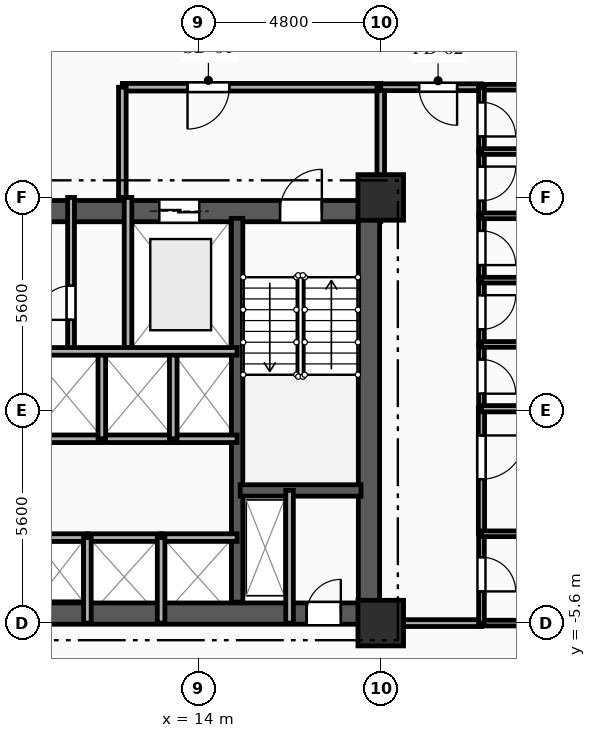
"""IFC4 building model, lengths in metres.
Left out: names, types, materials, properties, quantities, classifications, styles, units other than length and angle.
Written with IfcOpenShell. Run it as: python <this file> out.ifc"""

import sys

from ifc_helpers import new_model, si_unit, direction, frame, frame_2d, origin, origin_2d, place, context, subcontext, project, spatial, rectangle, extrude, element, fill, save


model = new_model("IFC4")
c1 = context("Model", 3, precision=1e-05, world=origin(), true_north=direction((0.0, 1.0)))
c2 = subcontext(c1, "Body", "Model", "MODEL_VIEW")
j1 = project(units=[si_unit("LENGTHUNIT", "METRE"), si_unit("PLANEANGLEUNIT", "RADIAN")], contexts=[c1])
p1 = place(None, origin())
s1 = spatial("IfcSite", under=j1, at=p1, CompositionType="ELEMENT")
p2 = place(p1, origin())
s2 = spatial("IfcBuilding", under=s1, at=p2, CompositionType="ELEMENT")
p3 = place(p2, frame((0.0, 0.0, 33.7)))
s3 = spatial("IfcBuildingStorey", under=s2, at=p3, CompositionType="ELEMENT", Elevation=33.7)
for number, where, z_axis, x_axis in (
    (1, (18.8, -5.6, 0.0), (0.0, 0.0, 1.0), (1.0, 0.0, 0.0)),
    (2, (18.8, 5.6, 0.0), (0.0, 0.0, 1.0), (1.0, 0.0, 0.0)),
):
    element("IfcColumn", number, at=place(p3, frame(where, z_axis=z_axis, x_axis=x_axis)), inside=s3, PredefinedType="COLUMN", context=c2, shape_type="SweptSolid", body=[
        extrude(rectangle(XDim=1.2, YDim=1.2, at=origin_2d()), origin(), (0.0, 0.0, 1.0), 3.35),
    ])
p4 = place(p3, frame((9.2, 5.24, 0.0), z_axis=(0.0, 0.0, 1.0), x_axis=(1.0, 0.0, 0.0)))
e3 = element("IfcWall", 3, at=p4, inside=s3, PredefinedType="SHEAR", context=c2, shape_type="SweptSolid", body=[
    extrude(rectangle(XDim=9.6, YDim=0.56, at=frame_2d((4.8, 0.0))), origin(), (0.0, 0.0, 1.0), 3.035),
])
p5 = place(p4, frame((6.95, 0.0, 0.0)))
e4 = element("IfcOpeningElement", 4, at=p5, cuts=e3, PredefinedType="OPENING", context=c2, shape_type="SweptSolid", body=[
    extrude(rectangle(XDim=1.1, YDim=2.15, at=frame_2d((0.55, 1.075))), frame((0.0, 0.29, 0.0), z_axis=(0.0, -1.0, 0.0), x_axis=(1.0, 0.0, 0.0)), (0.0, 0.0, 1.0), 0.58),
])
p6 = place(p4, frame((3.775, 0.0, 0.0)))
e5 = element("IfcOpeningElement", 5, at=p6, cuts=e3, PredefinedType="OPENING", context=c2, shape_type="SweptSolid", body=[
    extrude(rectangle(XDim=1.05, YDim=2.1, at=frame_2d((0.525, 1.05))), frame((0.0, 0.29, 0.0), z_axis=(0.0, -1.0, 0.0), x_axis=(1.0, 0.0, 0.0)), (0.0, 0.0, 1.0), 0.58),
])
p7 = place(p3, frame((9.2, -5.35, 0.0), z_axis=(0.0, 0.0, 1.0), x_axis=(1.0, 0.0, 0.0)))
e6 = element("IfcWall", 6, at=p7, inside=s3, PredefinedType="SHEAR", context=c2, shape_type="SweptSolid", body=[
    extrude(rectangle(XDim=9.6, YDim=0.56, at=frame_2d((4.8, 0.0))), origin(), (0.0, 0.0, 1.0), 3.035),
])
p8 = place(p7, frame((7.65, 0.0, 0.0)))
e7 = element("IfcOpeningElement", 7, at=p8, cuts=e6, PredefinedType="OPENING", context=c2, shape_type="SweptSolid", body=[
    extrude(rectangle(XDim=0.9, YDim=2.1, at=frame_2d((0.45, 1.05))), frame((0.0, 0.29, 0.0), z_axis=(0.0, -1.0, 0.0), x_axis=(1.0, 0.0, 0.0)), (0.0, 0.0, 1.0), 0.58),
])
p9 = place(p3, frame((18.49, -5.05, 0.0), z_axis=(0.0, 0.0, 1.0), x_axis=(0.0, 1.0, 0.0)))
e8 = element("IfcWall", 8, at=p9, inside=s3, PredefinedType="SHEAR", context=c2, shape_type="SweptSolid", body=[
    extrude(rectangle(XDim=10.1, YDim=0.56, at=frame_2d((5.05, 0.0))), origin(), (0.0, 0.0, 1.0), 3.035),
])
p10 = place(p3, frame((15.02, -5.05, 0.0), z_axis=(0.0, 0.0, 1.0), x_axis=(0.0, 1.0, 0.0)))
e9 = element("IfcWall", 9, at=p10, inside=s3, PredefinedType="SHEAR", context=c2, shape_type="SweptSolid", body=[
    extrude(rectangle(XDim=10.1, YDim=0.3, at=frame_2d((5.05, 0.0))), origin(), (0.0, 0.0, 1.0), 3.035),
])
p11 = place(p3, frame((15.1, -2.11, 0.0), z_axis=(0.0, 0.0, 1.0), x_axis=(1.0, 0.0, 0.0)))
e10 = element("IfcWall", 10, at=p11, inside=s3, PredefinedType="SHEAR", context=c2, shape_type="SweptSolid", body=[
    extrude(rectangle(XDim=3.18, YDim=0.3, at=frame_2d((1.59, 0.0))), origin(), (0.0, 0.0, 1.0), 3.035),
])
p12 = place(p3, frame((16.4, -2.11, 0.0), z_axis=(0.0, 0.0, 1.0), x_axis=(0.0, -1.0, 0.0)))
e11 = element("IfcWall", 11, at=p12, inside=s3, PredefinedType="PARTITIONING", context=c2, shape_type="SweptSolid", body=[
    extrude(rectangle(XDim=3.49, YDim=0.2, at=frame_2d((1.745, 0.0))), origin(), (0.0, 0.0, 1.0), 3.035),
])
p13 = place(p3, frame((12.15, 5.6, 0.0), z_axis=(0.0, 0.0, 1.0), x_axis=(0.0, -1.0, 0.0)))
e12 = element("IfcWall", 12, at=p13, inside=s3, PredefinedType="PARTITIONING", context=c2, shape_type="SweptSolid", body=[
    extrude(rectangle(XDim=4.05, YDim=0.2, at=frame_2d((2.025, 0.0))), origin(), (0.0, 0.0, 1.0), 3.035),
])
p14 = place(p3, frame((18.8, 8.5, 0.0), z_axis=(0.0, 0.0, 1.0), x_axis=(-1.0, 0.0, 0.0)))
e13 = element("IfcWall", 13, at=p14, inside=s3, PredefinedType="PARTITIONING", context=c2, shape_type="SweptSolid", body=[
    extrude(rectangle(XDim=6.8, YDim=0.2, at=frame_2d((3.4, 0.0))), origin(), (0.0, 0.0, 1.0), 3.035),
])
p15 = place(p14, frame((3.985, 0.0, 0.0)))
e14 = element("IfcOpeningElement", 14, at=p15, cuts=e13, PredefinedType="OPENING", context=c2, shape_type="SweptSolid", body=[
    extrude(rectangle(XDim=1.1, YDim=2.15, at=frame_2d((0.55, 1.075))), frame((0.0, 0.11, 0.0), z_axis=(0.0, -1.0, 0.0), x_axis=(1.0, 0.0, 0.0)), (0.0, 0.0, 1.0), 0.22),
])
p16 = place(p3, frame((12.0, 8.5, 0.0), z_axis=(0.0, 0.0, 1.0), x_axis=(0.0, -1.0, 0.0)))
e15 = element("IfcWall", 15, at=p16, inside=s3, PredefinedType="PARTITIONING", context=c2, shape_type="SweptSolid", body=[
    extrude(rectangle(XDim=2.9, YDim=0.2, at=frame_2d((1.45, 0.0))), origin(), (0.0, 0.0, 1.0), 3.035),
])
p17 = place(p3, frame((18.8, 5.6, 0.0), z_axis=(0.0, 0.0, 1.0), x_axis=(0.0, 1.0, 0.0)))
e16 = element("IfcWall", 16, at=p17, inside=s3, PredefinedType="PARTITIONING", context=c2, shape_type="SweptSolid", body=[
    extrude(rectangle(XDim=2.9, YDim=0.2, at=frame_2d((1.45, 0.0))), origin(), (0.0, 0.0, 1.0), 2.52),
])
p18 = place(p3, frame((10.65, 1.55, 0.0), z_axis=(0.0, 0.0, 1.0), x_axis=(0.0, 1.0, 0.0)))
e17 = element("IfcWall", 17, at=p18, inside=s3, PredefinedType="PARTITIONING", context=c2, shape_type="SweptSolid", body=[
    extrude(rectangle(XDim=4.05, YDim=0.18, at=frame_2d((2.025, 0.0))), origin(), (0.0, 0.0, 1.0), 3.035),
])
p19 = place(p18, frame((0.829, 0.0, 0.0)))
e18 = element("IfcOpeningElement", 18, at=p19, cuts=e17, PredefinedType="OPENING", context=c2, shape_type="SweptSolid", body=[
    extrude(rectangle(XDim=0.9, YDim=2.1, at=frame_2d((0.45, 1.05))), frame((0.0, 0.1, 0.0), z_axis=(0.0, -1.0, 0.0), x_axis=(1.0, 0.0, 0.0)), (0.0, 0.0, 1.0), 0.2),
])
p20 = place(p3, frame((9.2, -3.35, 0.0), z_axis=(0.0, 0.0, 1.0), x_axis=(1.0, 0.0, 0.0)))
e19 = element("IfcWall", 19, at=p20, inside=s3, PredefinedType="PARTITIONING", context=c2, shape_type="SweptSolid", body=[
    extrude(rectangle(XDim=1.88, YDim=0.2, at=frame_2d((0.94, 0.0))), origin(), (0.0, 0.0, 1.0), 2.75),
])
p21 = place(p3, frame((11.08, -3.35, 0.0), z_axis=(0.0, 0.0, 1.0), x_axis=(1.0, 0.0, 0.0)))
e20 = element("IfcWall", 20, at=p21, inside=s3, PredefinedType="PARTITIONING", context=c2, shape_type="SweptSolid", body=[
    extrude(rectangle(XDim=1.94, YDim=0.2, at=frame_2d((0.97, 0.0))), origin(), (0.0, 0.0, 1.0), 3.035),
])
p22 = place(p3, frame((13.02, -3.35, 0.0), z_axis=(0.0, 0.0, 1.0), x_axis=(1.0, 0.0, 0.0)))
e21 = element("IfcWall", 21, at=p22, inside=s3, PredefinedType="PARTITIONING", context=c2, shape_type="SweptSolid", body=[
    extrude(rectangle(XDim=2.0, YDim=0.2, at=frame_2d((1.0, 0.0))), origin(), (0.0, 0.0, 1.0), 3.035),
])
p23 = place(p3, frame((11.46, -0.75, 0.0), z_axis=(0.0, 0.0, 1.0), x_axis=(-1.0, 0.0, 0.0)))
e22 = element("IfcWall", 22, at=p23, inside=s3, PredefinedType="PARTITIONING", context=c2, shape_type="SweptSolid", body=[
    extrude(rectangle(XDim=2.26, YDim=0.2, at=frame_2d((1.13, 0.0))), origin(), (0.0, 0.0, 1.0), 3.035),
])
p24 = place(p3, frame((13.34, -0.75, 0.0), z_axis=(0.0, 0.0, 1.0), x_axis=(-1.0, 0.0, 0.0)))
e23 = element("IfcWall", 23, at=p24, inside=s3, PredefinedType="PARTITIONING", context=c2, shape_type="SweptSolid", body=[
    extrude(rectangle(XDim=1.88, YDim=0.2, at=frame_2d((0.94, 0.0))), origin(), (0.0, 0.0, 1.0), 3.035),
])
p25 = place(p3, frame((15.02, -0.75, 0.0), z_axis=(0.0, 0.0, 1.0), x_axis=(-1.0, 0.0, 0.0)))
e24 = element("IfcWall", 24, at=p25, inside=s3, PredefinedType="PARTITIONING", context=c2, shape_type="SweptSolid", body=[
    extrude(rectangle(XDim=1.68, YDim=0.2, at=frame_2d((0.84, 0.0))), origin(), (0.0, 0.0, 1.0), 3.035),
])
for number, where, z_axis, x_axis in (
    (25, (11.08, -5.6, 0.0), (0.0, 0.0, 1.0), (0.0, 1.0, 0.0)),
    (26, (13.02, -5.6, 0.0), (0.0, 0.0, 1.0), (0.0, 1.0, 0.0)),
):
    element("IfcWall", number, at=place(p3, frame(where, z_axis=z_axis, x_axis=x_axis)), inside=s3, PredefinedType="PARTITIONING", context=c2, shape_type="SweptSolid", body=[
        extrude(rectangle(XDim=2.25, YDim=0.2, at=frame_2d((1.125, 0.0))), origin(), (0.0, 0.0, 1.0), 3.035),
    ])
for number, where, z_axis, x_axis in (
    (27, (11.46, -0.75, 0.0), (0.0, 0.0, 1.0), (0.0, 1.0, 0.0)),
    (28, (13.34, -0.75, 0.0), (0.0, 0.0, 1.0), (0.0, 1.0, 0.0)),
):
    element("IfcWall", number, at=place(p3, frame(where, z_axis=z_axis, x_axis=x_axis)), inside=s3, PredefinedType="PARTITIONING", context=c2, shape_type="SweptSolid", body=[
        extrude(rectangle(XDim=2.3, YDim=0.2, at=frame_2d((1.15, 0.0))), origin(), (0.0, 0.0, 1.0), 3.035),
    ])
p26 = place(p3, frame((21.45, 8.5, 0.0), z_axis=(0.0, 0.0, 1.0), x_axis=(-1.0, 0.0, 0.0)))
e29 = element("IfcWall", 29, at=p26, inside=s3, PredefinedType="PARTITIONING", context=c2, shape_type="SweptSolid", body=[
    extrude(rectangle(XDim=2.65, YDim=0.18, at=frame_2d((1.325, 0.0))), origin(), (0.0, 0.0, 1.0), 3.035),
])
p27 = place(p26, frame((0.641, 0.0, 0.0)))
e30 = element("IfcOpeningElement", 30, at=p27, cuts=e29, PredefinedType="OPENING", context=c2, shape_type="SweptSolid", body=[
    extrude(rectangle(XDim=1.0, YDim=2.15, at=frame_2d((0.5, 1.075))), frame((0.0, 0.1, 0.0), z_axis=(0.0, -1.0, 0.0), x_axis=(1.0, 0.0, 0.0)), (0.0, 0.0, 1.0), 0.2),
])
p28 = place(p3, frame((23.0, 8.5, 0.0), z_axis=(0.0, 0.0, 1.0), x_axis=(-1.0, 0.0, 0.0)))
e31 = element("IfcWall", 31, at=p28, inside=s3, PredefinedType="PARTITIONING", context=c2, shape_type="SweptSolid", body=[
    extrude(rectangle(XDim=1.55, YDim=0.15, at=frame_2d((0.775, 0.0))), origin(), (0.0, 0.0, 1.0), 3.035),
])
p29 = place(p3, frame((18.8, -5.6, 0.0), z_axis=(0.0, 0.0, 1.0), x_axis=(1.0, 0.0, 0.0)))
e32 = element("IfcWall", 32, at=p29, inside=s3, PredefinedType="PARTITIONING", context=c2, shape_type="SweptSolid", body=[
    extrude(rectangle(XDim=2.65, YDim=0.18, at=frame_2d((1.325, 0.0))), origin(), (0.0, 0.0, 1.0), 3.035),
])
p30 = place(p3, frame((21.45, -5.6, 0.0), z_axis=(0.0, 0.0, 1.0), x_axis=(1.0, 0.0, 0.0)))
e33 = element("IfcWall", 33, at=p30, inside=s3, PredefinedType="PLUMBINGWALL", context=c2, shape_type="SweptSolid", body=[
    extrude(rectangle(XDim=1.55, YDim=0.15, at=frame_2d((0.775, 0.0))), origin(), (0.0, 0.0, 1.0), 3.035),
])
p31 = place(p3, frame((21.45, -3.25, 0.0), z_axis=(0.0, 0.0, 1.0), x_axis=(0.0, -1.0, 0.0)))
e34 = element("IfcWall", 34, at=p31, inside=s3, PredefinedType="PLUMBINGWALL", context=c2, shape_type="SweptSolid", body=[
    extrude(rectangle(XDim=2.35, YDim=0.15, at=frame_2d((1.175, 0.0))), origin(), (0.0, 0.0, 1.0), 3.035),
])
p32 = place(p31, frame((0.616, 0.0, 0.0)))
e35 = element("IfcOpeningElement", 35, at=p32, cuts=e34, PredefinedType="OPENING", context=c2, shape_type="SweptSolid", body=[
    extrude(rectangle(XDim=0.9, YDim=2.1, at=frame_2d((0.45, 1.05))), frame((0.0, 0.085, 0.0), z_axis=(0.0, -1.0, 0.0), x_axis=(1.0, 0.0, 0.0)), (0.0, 0.0, 1.0), 0.17),
])
p33 = place(p3, frame((21.45, 0.04, 0.0), z_axis=(0.0, 0.0, 1.0), x_axis=(0.0, -1.0, 0.0)))
e36 = element("IfcWall", 36, at=p33, inside=s3, PredefinedType="PARTITIONING", context=c2, shape_type="SweptSolid", body=[
    extrude(rectangle(XDim=3.29, YDim=0.165, at=frame_2d((1.645, 0.0))), origin(), (0.0, 0.0, 1.0), 3.035),
])
p34 = place(p33, frame((0.702, 0.0, 0.0)))
e37 = element("IfcOpeningElement", 37, at=p34, cuts=e36, PredefinedType="OPENING", context=c2, shape_type="SweptSolid", body=[
    extrude(rectangle(XDim=1.15, YDim=2.15, at=frame_2d((0.575, 1.075))), frame((0.0, 0.093, 0.0), z_axis=(0.0, -1.0, 0.0), x_axis=(1.0, 0.0, 0.0)), (0.0, 0.0, 1.0), 0.185),
])
p35 = place(p3, frame((21.45, 1.732, 0.0), z_axis=(0.0, 0.0, 1.0), x_axis=(0.0, -1.0, 0.0)))
e38 = element("IfcWall", 38, at=p35, inside=s3, PredefinedType="PARTITIONING", context=c2, shape_type="SweptSolid", body=[
    extrude(rectangle(XDim=1.692, YDim=0.15, at=frame_2d((0.846, 0.0))), origin(), (0.0, 0.0, 1.0), 3.035),
])
p36 = place(p35, frame((0.396, 0.0, 0.0)))
e39 = element("IfcOpeningElement", 39, at=p36, cuts=e38, PredefinedType="OPENING", context=c2, shape_type="SweptSolid", body=[
    extrude(rectangle(XDim=0.9, YDim=2.1, at=frame_2d((0.45, 1.05))), frame((0.0, 0.085, 0.0), z_axis=(0.0, -1.0, 0.0), x_axis=(1.0, 0.0, 0.0)), (0.0, 0.0, 1.0), 0.17),
])
p37 = place(p3, frame((21.45, 3.424, 0.0), z_axis=(0.0, 0.0, 1.0), x_axis=(0.0, -1.0, 0.0)))
e40 = element("IfcWall", 40, at=p37, inside=s3, PredefinedType="PARTITIONING", context=c2, shape_type="SweptSolid", body=[
    extrude(rectangle(XDim=1.692, YDim=0.15, at=frame_2d((0.846, 0.0))), origin(), (0.0, 0.0, 1.0), 3.035),
])
p38 = place(p37, frame((0.396, 0.0, 0.0)))
e41 = element("IfcOpeningElement", 41, at=p38, cuts=e40, PredefinedType="OPENING", context=c2, shape_type="SweptSolid", body=[
    extrude(rectangle(XDim=0.9, YDim=2.1, at=frame_2d((0.45, 1.05))), frame((0.0, 0.085, 0.0), z_axis=(0.0, -1.0, 0.0), x_axis=(1.0, 0.0, 0.0)), (0.0, 0.0, 1.0), 0.17),
])
p39 = place(p3, frame((21.45, 5.116, 0.0), z_axis=(0.0, 0.0, 1.0), x_axis=(0.0, -1.0, 0.0)))
e42 = element("IfcWall", 42, at=p39, inside=s3, PredefinedType="PARTITIONING", context=c2, shape_type="SweptSolid", body=[
    extrude(rectangle(XDim=1.692, YDim=0.15, at=frame_2d((0.846, 0.0))), origin(), (0.0, 0.0, 1.0), 3.035),
])
p40 = place(p39, frame((0.396, 0.0, 0.0)))
e43 = element("IfcOpeningElement", 43, at=p40, cuts=e42, PredefinedType="OPENING", context=c2, shape_type="SweptSolid", body=[
    extrude(rectangle(XDim=0.9, YDim=2.1, at=frame_2d((0.45, 1.05))), frame((0.0, 0.085, 0.0), z_axis=(0.0, -1.0, 0.0), x_axis=(1.0, 0.0, 0.0)), (0.0, 0.0, 1.0), 0.17),
])
p41 = place(p3, frame((21.45, 6.808, 0.0), z_axis=(0.0, 0.0, 1.0), x_axis=(0.0, -1.0, 0.0)))
e44 = element("IfcWall", 44, at=p41, inside=s3, PredefinedType="PARTITIONING", context=c2, shape_type="SweptSolid", body=[
    extrude(rectangle(XDim=1.692, YDim=0.15, at=frame_2d((0.846, 0.0))), origin(), (0.0, 0.0, 1.0), 3.035),
])
p42 = place(p41, frame((0.396, 0.0, 0.0)))
e45 = element("IfcOpeningElement", 45, at=p42, cuts=e44, PredefinedType="OPENING", context=c2, shape_type="SweptSolid", body=[
    extrude(rectangle(XDim=0.9, YDim=2.1, at=frame_2d((0.45, 1.05))), frame((0.0, 0.085, 0.0), z_axis=(0.0, -1.0, 0.0), x_axis=(1.0, 0.0, 0.0)), (0.0, 0.0, 1.0), 0.17),
])
p43 = place(p3, frame((21.45, 8.5, 0.0), z_axis=(0.0, 0.0, 1.0), x_axis=(0.0, -1.0, 0.0)))
e46 = element("IfcWall", 46, at=p43, inside=s3, PredefinedType="PARTITIONING", context=c2, shape_type="SweptSolid", body=[
    extrude(rectangle(XDim=1.692, YDim=0.15, at=frame_2d((0.846, 0.0))), origin(), (0.0, 0.0, 1.0), 3.035),
])
p44 = place(p43, frame((0.396, 0.0, 0.0)))
e47 = element("IfcOpeningElement", 47, at=p44, cuts=e46, PredefinedType="OPENING", context=c2, shape_type="SweptSolid", body=[
    extrude(rectangle(XDim=0.9, YDim=2.1, at=frame_2d((0.45, 1.05))), frame((0.0, 0.085, 0.0), z_axis=(0.0, -1.0, 0.0), x_axis=(1.0, 0.0, 0.0)), (0.0, 0.0, 1.0), 0.17),
])
p45 = place(p3, frame((21.45, -3.25, 0.0), z_axis=(0.0, 0.0, 1.0), x_axis=(1.0, 0.0, 0.0)))
e48 = element("IfcWall", 48, at=p45, inside=s3, PredefinedType="PLUMBINGWALL", context=c2, shape_type="SweptSolid", body=[
    extrude(rectangle(XDim=3.2, YDim=0.15, at=frame_2d((1.6, 0.0))), origin(), (0.0, 0.0, 1.0), 2.52),
])
p46 = place(p3, frame((21.45, 0.04, 0.0), z_axis=(0.0, 0.0, 1.0), x_axis=(1.0, 0.0, 0.0)))
e49 = element("IfcWall", 49, at=p46, inside=s3, PredefinedType="PARTITIONING", context=c2, shape_type="SweptSolid", body=[
    extrude(rectangle(XDim=11.35, YDim=0.165, at=frame_2d((5.675, 0.0))), origin(), (0.0, 0.0, 1.0), 3.035),
])
p47 = place(p3, frame((21.45, 1.732, 0.0), z_axis=(0.0, 0.0, 1.0), x_axis=(1.0, 0.0, 0.0)))
e50 = element("IfcWall", 50, at=p47, inside=s3, PredefinedType="PARTITIONING", context=c2, shape_type="SweptSolid", body=[
    extrude(rectangle(XDim=11.35, YDim=0.15, at=frame_2d((5.675, 0.0))), origin(), (0.0, 0.0, 1.0), 3.035),
])
for number, where, z_axis, x_axis in (
    (51, (21.45, 3.424, 0.0), (0.0, 0.0, 1.0), (1.0, 0.0, 0.0)),
    (52, (21.45, 5.116, 0.0), (0.0, 0.0, 1.0), (1.0, 0.0, 0.0)),
):
    element("IfcWall", number, at=place(p3, frame(where, z_axis=z_axis, x_axis=x_axis)), inside=s3, PredefinedType="PARTITIONING", context=c2, shape_type="SweptSolid", body=[
        extrude(rectangle(XDim=11.35, YDim=0.15, at=frame_2d((5.675, 0.0))), origin(), (0.0, 0.0, 1.0), 2.52),
    ])
p48 = place(p3, frame((21.45, 6.808, 0.0), z_axis=(0.0, 0.0, 1.0), x_axis=(1.0, 0.0, 0.0)))
e53 = element("IfcWall", 53, at=p48, inside=s3, PredefinedType="PARTITIONING", context=c2, shape_type="SweptSolid", body=[
    extrude(rectangle(XDim=11.35, YDim=0.15, at=frame_2d((5.675, 0.0))), origin(), (0.0, 0.0, 1.0), 3.035),
])
p49 = place(p3, frame((9.2, 1.55, 0.0), z_axis=(0.0, 0.0, 1.0), x_axis=(1.0, 0.0, 0.0)))
e54 = element("IfcWall", 54, at=p49, inside=s3, PredefinedType="PARTITIONING", context=c2, shape_type="SweptSolid", body=[
    extrude(rectangle(XDim=5.82, YDim=0.2, at=frame_2d((2.91, 0.0))), origin(), (0.0, 0.0, 1.0), 3.035),
])
p50 = place(p5, origin())
e55 = element("IfcDoor", 55, at=p50, inside=s3, OperationType="SINGLE_SWING_RIGHT", PredefinedType="DOOR", context=c2, shape_type="SweptSolid", body=[
    extrude(rectangle(XDim=1.1, YDim=2.15, at=frame_2d((0.55, 1.075))), frame((0.0, 0.025, 0.0), z_axis=(0.0, -1.0, 0.0), x_axis=(1.0, 0.0, 0.0)), (0.0, 0.0, 1.0), 0.05),
])
fill(e4, e55)
p51 = place(p6, origin())
e56 = element("IfcDoor", 56, at=p51, inside=s3, OperationType="DOUBLE_DOOR_SLIDING", PredefinedType="DOOR", context=c2, shape_type="SweptSolid", body=[
    extrude(rectangle(XDim=1.05, YDim=2.1, at=frame_2d((0.525, 1.05))), frame((0.0, 0.025, 0.0), z_axis=(0.0, -1.0, 0.0), x_axis=(1.0, 0.0, 0.0)), (0.0, 0.0, 1.0), 0.05),
])
fill(e5, e56)
p52 = place(p8, origin())
e57 = element("IfcDoor", 57, at=p52, inside=s3, OperationType="SINGLE_SWING_RIGHT", PredefinedType="DOOR", context=c2, shape_type="SweptSolid", body=[
    extrude(rectangle(XDim=0.9, YDim=2.1, at=frame_2d((0.45, 1.05))), frame((0.0, 0.025, 0.0), z_axis=(0.0, -1.0, 0.0), x_axis=(1.0, 0.0, 0.0)), (0.0, 0.0, 1.0), 0.05),
])
fill(e7, e57)
p53 = place(p15, origin())
e58 = element("IfcDoor", 58, at=p53, inside=s3, OperationType="SINGLE_SWING_RIGHT", PredefinedType="DOOR", context=c2, shape_type="SweptSolid", body=[
    extrude(rectangle(XDim=1.1, YDim=2.15, at=frame_2d((0.55, 1.075))), frame((0.0, 0.025, 0.0), z_axis=(0.0, -1.0, 0.0), x_axis=(1.0, 0.0, 0.0)), (0.0, 0.0, 1.0), 0.05),
])
fill(e14, e58)
p54 = place(p19, origin())
e59 = element("IfcDoor", 59, at=p54, inside=s3, OperationType="SINGLE_SWING_LEFT", PredefinedType="DOOR", context=c2, shape_type="SweptSolid", body=[
    extrude(rectangle(XDim=0.9, YDim=2.1, at=frame_2d((0.45, 1.05))), frame((0.0, 0.025, 0.0), z_axis=(0.0, -1.0, 0.0), x_axis=(1.0, 0.0, 0.0)), (0.0, 0.0, 1.0), 0.05),
])
fill(e18, e59)
p55 = place(p27, origin())
e60 = element("IfcDoor", 60, at=p55, inside=s3, OperationType="SINGLE_SWING_LEFT", PredefinedType="DOOR", context=c2, shape_type="SweptSolid", body=[
    extrude(rectangle(XDim=1.0, YDim=2.15, at=frame_2d((0.5, 1.075))), frame((0.0, 0.025, 0.0), z_axis=(0.0, -1.0, 0.0), x_axis=(1.0, 0.0, 0.0)), (0.0, 0.0, 1.0), 0.05),
])
fill(e30, e60)
p56 = place(p32, origin())
e61 = element("IfcDoor", 61, at=p56, inside=s3, OperationType="SINGLE_SWING_RIGHT", PredefinedType="DOOR", context=c2, shape_type="SweptSolid", body=[
    extrude(rectangle(XDim=0.9, YDim=2.1, at=frame_2d((0.45, 1.05))), frame((0.0, 0.025, 0.0), z_axis=(0.0, -1.0, 0.0), x_axis=(1.0, 0.0, 0.0)), (0.0, 0.0, 1.0), 0.05),
])
fill(e35, e61)
p57 = place(p34, origin())
e62 = element("IfcDoor", 62, at=p57, inside=s3, OperationType="SINGLE_SWING_LEFT", PredefinedType="DOOR", context=c2, shape_type="SweptSolid", body=[
    extrude(rectangle(XDim=1.15, YDim=2.15, at=frame_2d((0.575, 1.075))), frame((0.0, 0.025, 0.0), z_axis=(0.0, -1.0, 0.0), x_axis=(1.0, 0.0, 0.0)), (0.0, 0.0, 1.0), 0.05),
])
fill(e37, e62)
p58 = place(p36, origin())
e63 = element("IfcDoor", 63, at=p58, inside=s3, OperationType="SINGLE_SWING_RIGHT", PredefinedType="DOOR", context=c2, shape_type="SweptSolid", body=[
    extrude(rectangle(XDim=0.9, YDim=2.1, at=frame_2d((0.45, 1.05))), frame((0.0, 0.025, 0.0), z_axis=(0.0, -1.0, 0.0), x_axis=(1.0, 0.0, 0.0)), (0.0, 0.0, 1.0), 0.05),
])
fill(e39, e63)
p59 = place(p38, origin())
e64 = element("IfcDoor", 64, at=p59, inside=s3, OperationType="SINGLE_SWING_LEFT", PredefinedType="DOOR", context=c2, shape_type="SweptSolid", body=[
    extrude(rectangle(XDim=0.9, YDim=2.1, at=frame_2d((0.45, 1.05))), frame((0.0, 0.025, 0.0), z_axis=(0.0, -1.0, 0.0), x_axis=(1.0, 0.0, 0.0)), (0.0, 0.0, 1.0), 0.05),
])
fill(e41, e64)
p60 = place(p40, origin())
e65 = element("IfcDoor", 65, at=p60, inside=s3, OperationType="SINGLE_SWING_RIGHT", PredefinedType="DOOR", context=c2, shape_type="SweptSolid", body=[
    extrude(rectangle(XDim=0.9, YDim=2.1, at=frame_2d((0.45, 1.05))), frame((0.0, 0.025, 0.0), z_axis=(0.0, -1.0, 0.0), x_axis=(1.0, 0.0, 0.0)), (0.0, 0.0, 1.0), 0.05),
])
fill(e43, e65)
p61 = place(p42, origin())
e66 = element("IfcDoor", 66, at=p61, inside=s3, OperationType="SINGLE_SWING_LEFT", PredefinedType="DOOR", context=c2, shape_type="SweptSolid", body=[
    extrude(rectangle(XDim=0.9, YDim=2.1, at=frame_2d((0.45, 1.05))), frame((0.0, 0.025, 0.0), z_axis=(0.0, -1.0, 0.0), x_axis=(1.0, 0.0, 0.0)), (0.0, 0.0, 1.0), 0.05),
])
fill(e45, e66)
p62 = place(p44, origin())
e67 = element("IfcDoor", 67, at=p62, inside=s3, OperationType="SINGLE_SWING_RIGHT", PredefinedType="DOOR", context=c2, shape_type="SweptSolid", body=[
    extrude(rectangle(XDim=0.9, YDim=2.1, at=frame_2d((0.45, 1.05))), frame((0.0, 0.025, 0.0), z_axis=(0.0, -1.0, 0.0), x_axis=(1.0, 0.0, 0.0)), (0.0, 0.0, 1.0), 0.05),
])
fill(e47, e67)
save(model, sys.argv[1])
